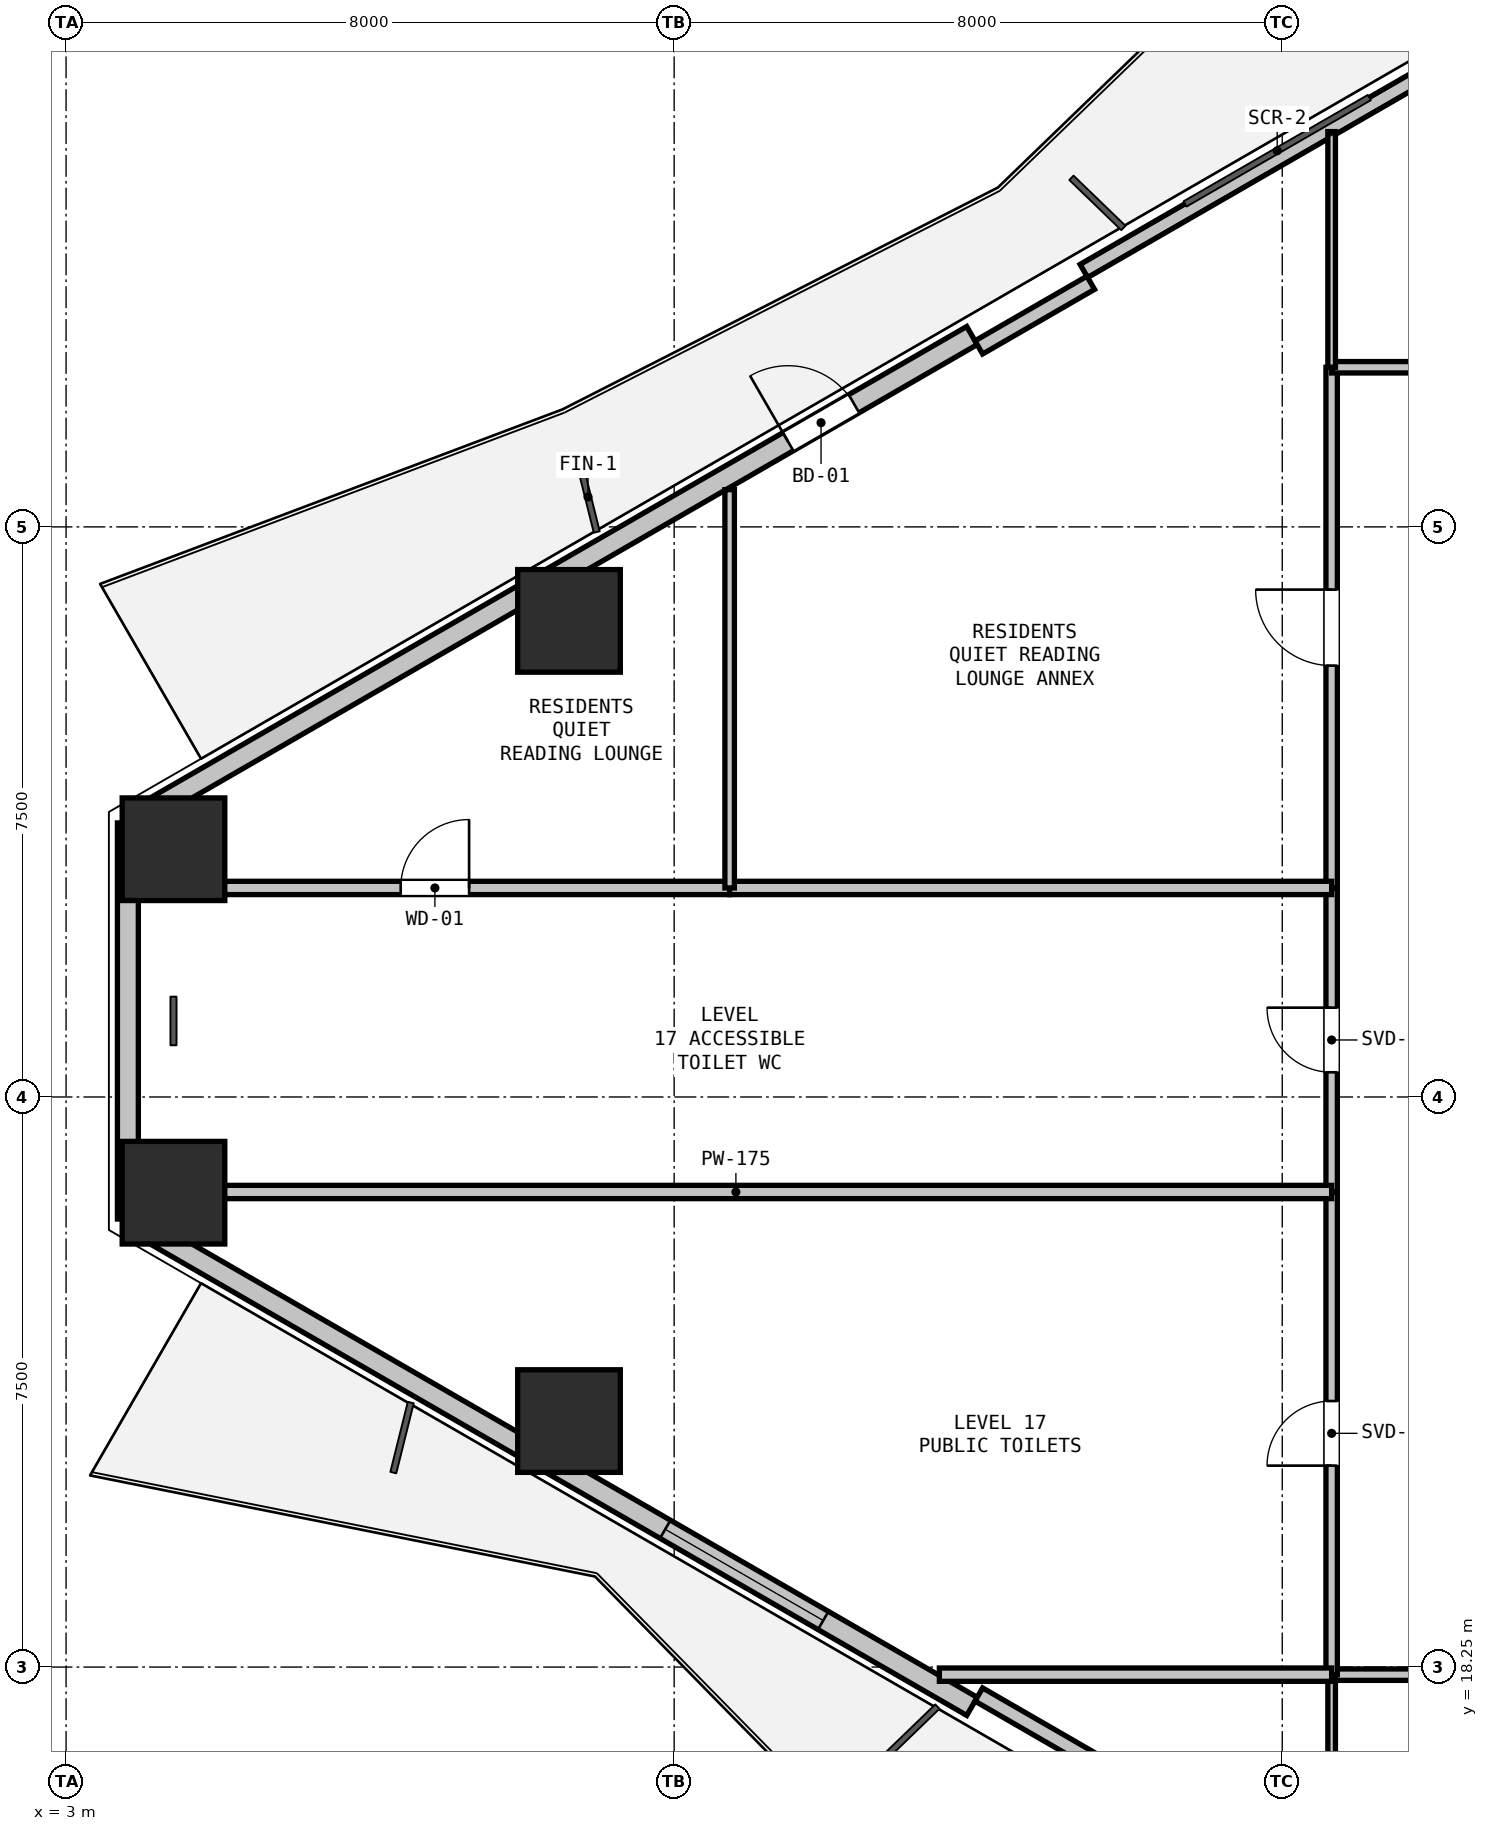
"""IFC4 building model, lengths in metres.
Left out: names, types, materials, properties, quantities, classifications, styles, units other than length and angle.
Written with IfcOpenShell. Run it as: python <this file> out.ifc"""

import sys

from ifc_helpers import new_model, si_unit, direction, frame, frame_2d, origin, origin_2d, place, context, subcontext, project, spatial, rectangle, hollow_rectangle, extrude, element, fill, save


model = new_model("IFC4")
c1 = context("Model", 3, precision=1e-05, world=origin(), true_north=direction((0.0, 1.0)))
c2 = subcontext(c1, "Body", "Model", "MODEL_VIEW")
j1 = project(units=[si_unit("LENGTHUNIT", "METRE"), si_unit("PLANEANGLEUNIT", "RADIAN")], contexts=[c1])
p1 = place(None, origin())
s1 = spatial("IfcSite", under=j1, at=p1, CompositionType="ELEMENT")
p2 = place(p1, origin())
s2 = spatial("IfcBuilding", under=s1, at=p2, CompositionType="ELEMENT")
p3 = place(p2, frame((0.0, 0.0, 62.1)))
s3 = spatial("IfcBuildingStorey", under=s2, at=p3, CompositionType="ELEMENT", Elevation=62.1)
p4 = place(p3, frame((4.413, 29.009, 0.0), z_axis=(0.0, 0.0, 1.0), x_axis=(1.0, 0.0, 0.0)))
e1 = element("IfcColumn", 1, at=p4, inside=s3, PredefinedType="COLUMN", context=c2, shape_type="SweptSolid", body=[
    extrude(hollow_rectangle(XDim=1.35, YDim=1.35, WallThickness=0.036, at=origin_2d()), origin(), (0.0, 0.0, 1.0), 2.88),
])
for number, where, z_axis, x_axis in (
    (2, (9.617, 32.014, 0.0), (0.0, 0.0, 1.0), (1.0, 0.0, 0.0)),
    (3, (9.617, 21.486, 0.0), (0.0, 0.0, 1.0), (1.0, 0.0, 0.0)),
):
    element("IfcColumn", number, at=place(p3, frame(where, z_axis=z_axis, x_axis=x_axis)), inside=s3, PredefinedType="COLUMN", context=c2, shape_type="SweptSolid", body=[
        extrude(hollow_rectangle(XDim=1.35, YDim=1.35, WallThickness=0.036, at=origin_2d()), origin(), (0.0, 0.0, 1.0), 3.13),
    ])
p5 = place(p3, frame((4.413, 24.491, 0.0), z_axis=(0.0, 0.0, 1.0), x_axis=(1.0, 0.0, 0.0)))
e4 = element("IfcColumn", 4, at=p5, inside=s3, PredefinedType="COLUMN", context=c2, shape_type="SweptSolid", body=[
    extrude(hollow_rectangle(XDim=1.35, YDim=1.35, WallThickness=0.036, at=origin_2d()), origin(), (0.0, 0.0, 1.0), 2.88),
])
p6 = place(p3, frame((3.813, 24.144, 0.0), z_axis=(0.0, 0.0, 1.0), x_axis=(0.0, 1.0, 0.0)))
e5 = element("IfcWall", 5, at=p6, inside=s3, PredefinedType="SOLIDWALL", context=c2, shape_type="SweptSolid", body=[
    extrude(rectangle(XDim=5.211, YDim=0.275, at=frame_2d((2.606, 0.0))), origin(), (0.0, 0.0, 1.0), 4.1),
])
p7 = place(p3, frame((3.943, 29.431, 0.0), z_axis=(0.0, 0.0, 1.0), x_axis=(0.866027105532, 0.499997052475, 0.0)))
e6 = element("IfcWall", 6, at=p7, inside=s3, PredefinedType="SOLIDWALL", context=c2, shape_type="SweptSolid", body=[
    extrude(rectangle(XDim=12.673, YDim=0.275, at=frame_2d((6.336, 0.0))), origin(), (0.0, 0.0, 1.0), 2.865),
])
p8 = place(p7, frame((9.88, 0.0, 0.0)))
e7 = element("IfcOpeningElement", 7, at=p8, cuts=e6, PredefinedType="OPENING", context=c2, shape_type="SweptSolid", body=[
    extrude(rectangle(XDim=1.0, YDim=2.1, at=frame_2d((0.5, 1.05))), frame((0.0, 0.147, 0.0), z_axis=(0.0, -1.0, 0.0), x_axis=(1.0, 0.0, 0.0)), (0.0, 0.0, 1.0), 0.295),
])
p9 = place(p3, frame((16.39, 36.617, 0.0), z_axis=(0.0, 0.0, 1.0), x_axis=(0.866027351828, 0.499996625875, 0.0)))
e8 = element("IfcWall", 8, at=p9, inside=s3, PredefinedType="PARAPET", context=c2, shape_type="SweptSolid", body=[
    extrude(rectangle(XDim=11.973, YDim=0.2, at=frame_2d((5.987, 0.0))), origin(), (0.0, 0.0, 1.0), 0.2),
])
p10 = place(p3, frame((15.008, 35.611, 0.0), z_axis=(0.0, 0.0, 1.0), x_axis=(0.86605165483, 0.499954529098, 0.0)))
e9 = element("IfcWall", 9, at=p10, inside=s3, PredefinedType="PARAPET", context=c2, shape_type="SweptSolid", body=[
    extrude(rectangle(XDim=1.7, YDim=0.2, at=frame_2d((0.85, 0.0))), origin(), (0.0, 0.0, 1.0), 4.1),
])
p11 = place(p3, frame((14.918, 17.733, 0.0), z_axis=(0.0, 0.0, 1.0), x_axis=(-0.866027105532, 0.499997052475, 0.0)))
e10 = element("IfcWall", 10, at=p11, inside=s3, PredefinedType="SOLIDWALL", context=c2, shape_type="SweptSolid", body=[
    extrude(rectangle(XDim=12.673, YDim=0.275, at=frame_2d((6.336, 0.0))), origin(), (0.0, 0.0, 1.0), 2.865),
])
p12 = place(p11, frame((2.26, 0.0, 0.9)))
e11 = element("IfcOpeningElement", 11, at=p12, cuts=e10, PredefinedType="OPENING", context=c2, shape_type="SweptSolid", body=[
    extrude(rectangle(XDim=2.4, YDim=1.89, at=frame_2d((1.2, 0.945))), frame((0.0, 0.147, 0.0), z_axis=(0.0, -1.0, 0.0), x_axis=(1.0, 0.0, 0.0)), (0.0, 0.0, 1.0), 0.295),
])
p13 = place(p3, frame((16.48, 17.039, 0.0), z_axis=(0.0, 0.0, 1.0), x_axis=(-0.86605165483, 0.499954529098, 0.0)))
e12 = element("IfcWall", 12, at=p13, inside=s3, PredefinedType="PARAPET", context=c2, shape_type="SweptSolid", body=[
    extrude(rectangle(XDim=1.7, YDim=0.2, at=frame_2d((0.85, 0.0))), origin(), (0.0, 0.0, 1.0), 4.1),
])
p14 = place(p3, frame((26.5, 18.15, 0.0), z_axis=(0.0, 0.0, 1.0), x_axis=(-1.0, 0.0, 0.0)))
e13 = element("IfcWall", 13, at=p14, inside=s3, PredefinedType="PARTITIONING", context=c2, shape_type="SweptSolid", body=[
    extrude(rectangle(XDim=6.85, YDim=0.15, at=frame_2d((3.425, 0.0))), origin(), (0.0, 0.0, 1.0), 4.48),
])
p15 = place(p14, frame((2.925, 0.0, 0.0)))
e14 = element("IfcOpeningElement", 14, at=p15, cuts=e13, PredefinedType="OPENING", context=c2, shape_type="SweptSolid", body=[
    extrude(rectangle(XDim=1.0, YDim=2.15, at=frame_2d((0.5, 1.075))), frame((0.0, 0.085, 0.0), z_axis=(0.0, -1.0, 0.0), x_axis=(1.0, 0.0, 0.0)), (0.0, 0.0, 1.0), 0.17),
])
p16 = place(p3, frame((19.65, 18.15, 0.0), z_axis=(0.0, 0.0, 1.0), x_axis=(0.0, 1.0, 0.0)))
e15 = element("IfcWall", 15, at=p16, inside=s3, PredefinedType="PARTITIONING", context=c2, shape_type="SweptSolid", body=[
    extrude(rectangle(XDim=6.35, YDim=0.15, at=frame_2d((3.175, 0.0))), origin(), (0.0, 0.0, 1.0), 2.865),
])
p17 = place(p16, frame((2.75, 0.0, 0.0)))
e16 = element("IfcOpeningElement", 16, at=p17, cuts=e15, PredefinedType="OPENING", context=c2, shape_type="SweptSolid", body=[
    extrude(rectangle(XDim=0.85, YDim=2.1, at=frame_2d((0.425, 1.05))), frame((0.0, 0.085, 0.0), z_axis=(0.0, -1.0, 0.0), x_axis=(1.0, 0.0, 0.0)), (0.0, 0.0, 1.0), 0.17),
])
p18 = place(p3, frame((19.65, 24.5, 0.0), z_axis=(0.0, 0.0, 1.0), x_axis=(0.0, 1.0, 0.0)))
e17 = element("IfcWall", 17, at=p18, inside=s3, PredefinedType="PARTITIONING", context=c2, shape_type="SweptSolid", body=[
    extrude(rectangle(XDim=4.0, YDim=0.15, at=frame_2d((2.0, 0.0))), origin(), (0.0, 0.0, 1.0), 2.865),
])
p19 = place(p18, frame((1.575, 0.0, 0.0)))
e18 = element("IfcOpeningElement", 18, at=p19, cuts=e17, PredefinedType="OPENING", context=c2, shape_type="SweptSolid", body=[
    extrude(rectangle(XDim=0.85, YDim=2.1, at=frame_2d((0.425, 1.05))), frame((0.0, 0.085, 0.0), z_axis=(0.0, -1.0, 0.0), x_axis=(1.0, 0.0, 0.0)), (0.0, 0.0, 1.0), 0.17),
])
p20 = place(p3, frame((19.65, 28.5, 0.0), z_axis=(0.0, 0.0, 1.0), x_axis=(0.0, 1.0, 0.0)))
e19 = element("IfcWall", 19, at=p20, inside=s3, PredefinedType="PARTITIONING", context=c2, shape_type="SweptSolid", body=[
    extrude(rectangle(XDim=6.85, YDim=0.15, at=frame_2d((3.425, 0.0))), origin(), (0.0, 0.0, 1.0), 4.48),
])
p21 = place(p20, frame((2.925, 0.0, 0.0)))
e20 = element("IfcOpeningElement", 20, at=p21, cuts=e19, PredefinedType="OPENING", context=c2, shape_type="SweptSolid", body=[
    extrude(rectangle(XDim=1.0, YDim=2.15, at=frame_2d((0.5, 1.075))), frame((0.0, 0.085, 0.0), z_axis=(0.0, -1.0, 0.0), x_axis=(1.0, 0.0, 0.0)), (0.0, 0.0, 1.0), 0.17),
])
p22 = place(p3, frame((19.65, 35.35, 0.0), z_axis=(0.0, 0.0, 1.0), x_axis=(1.0, 0.0, 0.0)))
e21 = element("IfcWall", 21, at=p22, inside=s3, PredefinedType="PARTITIONING", context=c2, shape_type="SweptSolid", body=[
    extrude(rectangle(XDim=10.85, YDim=0.15, at=frame_2d((5.425, 0.0))), origin(), (0.0, 0.0, 1.0), 4.48),
])
p23 = place(p22, frame((4.525, 0.0, 0.0)))
e22 = element("IfcOpeningElement", 22, at=p23, cuts=e21, PredefinedType="OPENING", context=c2, shape_type="SweptSolid", body=[
    extrude(rectangle(XDim=1.8, YDim=2.2, at=frame_2d((0.9, 1.1))), frame((0.0, 0.085, 0.0), z_axis=(0.0, -1.0, 0.0), x_axis=(1.0, 0.0, 0.0)), (0.0, 0.0, 1.0), 0.17),
])
p24 = place(p3, frame((19.65, 15.049, 0.0), z_axis=(0.0, 0.0, 1.0), x_axis=(0.0, 1.0, 0.0)))
e23 = element("IfcWall", 23, at=p24, inside=s3, PredefinedType="PARTITIONING", context=c2, shape_type="SweptSolid", body=[
    extrude(rectangle(XDim=3.101, YDim=0.1, at=frame_2d((1.55, 0.0))), origin(), (0.0, 0.0, 1.0), 2.365),
])
p25 = place(p3, frame((3.975, 24.5, 0.0), z_axis=(0.0, 0.0, 1.0), x_axis=(1.0, 0.0, 0.0)))
e24 = element("IfcWall", 24, at=p25, inside=s3, PredefinedType="PLUMBINGWALL", context=c2, shape_type="SweptSolid", body=[
    extrude(rectangle(XDim=15.675, YDim=0.175, at=frame_2d((7.838, 0.0))), origin(), (0.0, 0.0, 1.0), 2.865),
])
p26 = place(p3, frame((19.65, 18.15, 0.0), z_axis=(0.0, 0.0, 1.0), x_axis=(-1.0, 0.0, 0.0)))
e25 = element("IfcWall", 25, at=p26, inside=s3, PredefinedType="PLUMBINGWALL", context=c2, shape_type="SweptSolid", body=[
    extrude(rectangle(XDim=5.161, YDim=0.175, at=frame_2d((2.58, 0.0))), origin(), (0.0, 0.0, 1.0), 2.365),
])
p27 = place(p3, frame((3.943, 24.069, 0.0), z_axis=(0.0, 0.0, 1.0), x_axis=(-0.866131372301, 0.499816412211, 0.0)))
e26 = element("IfcWall", 26, at=p27, inside=s3, PredefinedType="PLUMBINGWALL", context=c2, shape_type="SweptSolid", body=[
    extrude(rectangle(XDim=0.15, YDim=0.175, at=frame_2d((0.075, 0.0))), origin(), (0.0, 0.0, 1.0), 4.48),
])
p28 = place(p3, frame((3.975, 28.5, 0.0), z_axis=(0.0, 0.0, 1.0), x_axis=(1.0, 0.0, 0.0)))
e27 = element("IfcWall", 27, at=p28, inside=s3, PredefinedType="PLUMBINGWALL", context=c2, shape_type="SweptSolid", body=[
    extrude(rectangle(XDim=7.755, YDim=0.175, at=frame_2d((3.878, 0.0))), origin(), (0.0, 0.0, 1.0), 2.865),
])
p29 = place(p28, frame((3.428, 0.0, 0.0)))
e28 = element("IfcOpeningElement", 28, at=p29, cuts=e27, PredefinedType="OPENING", context=c2, shape_type="SweptSolid", body=[
    extrude(rectangle(XDim=0.9, YDim=2.1, at=frame_2d((0.45, 1.05))), frame((0.0, 0.097, 0.0), z_axis=(0.0, -1.0, 0.0), x_axis=(1.0, 0.0, 0.0)), (0.0, 0.0, 1.0), 0.195),
])
p30 = place(p3, frame((11.73, 28.5, 0.0), z_axis=(0.0, 0.0, 1.0), x_axis=(1.0, 0.0, 0.0)))
e29 = element("IfcWall", 29, at=p30, inside=s3, PredefinedType="PLUMBINGWALL", context=c2, shape_type="SweptSolid", body=[
    extrude(rectangle(XDim=7.92, YDim=0.175, at=frame_2d((3.96, 0.0))), origin(), (0.0, 0.0, 1.0), 3.115),
])
p31 = place(p3, frame((19.65, 35.35, 0.0), z_axis=(0.0, 0.0, 1.0), x_axis=(0.0, 1.0, 0.0)))
e30 = element("IfcWall", 30, at=p31, inside=s3, PredefinedType="PARTITIONING", context=c2, shape_type="SweptSolid", body=[
    extrude(rectangle(XDim=3.101, YDim=0.1, at=frame_2d((1.55, 0.0))), origin(), (0.0, 0.0, 1.0), 2.365),
])
p32 = place(p3, frame((3.813, 29.356, 0.0), z_axis=(0.0, 0.0, 1.0), x_axis=(0.866131372301, 0.499816412211, 0.0)))
e31 = element("IfcWall", 31, at=p32, inside=s3, PredefinedType="PARTITIONING", context=c2, shape_type="SweptSolid", body=[
    extrude(rectangle(XDim=0.15, YDim=0.1, at=frame_2d((0.075, 0.0))), origin(), (0.0, 0.0, 1.0), 4.48),
])
p33 = place(p3, frame((11.73, 33.74, 0.0), z_axis=(0.0, 0.0, 1.0), x_axis=(0.0, -1.0, 0.0)))
e32 = element("IfcWall", 32, at=p33, inside=s3, PredefinedType="PARTITIONING", context=c2, shape_type="SweptSolid", body=[
    extrude(rectangle(XDim=5.24, YDim=0.125, at=frame_2d((2.62, 0.0))), origin(), (0.0, 0.0, 1.0), 2.365),
])
p34 = place(p8, origin())
e33 = element("IfcDoor", 33, at=p34, inside=s3, OperationType="SINGLE_SWING_LEFT", PredefinedType="DOOR", context=c2, shape_type="SweptSolid", body=[
    extrude(rectangle(XDim=1.0, YDim=2.1, at=frame_2d((0.5, 1.05))), frame((0.0, 0.025, 0.0), z_axis=(0.0, -1.0, 0.0), x_axis=(1.0, 0.0, 0.0)), (0.0, 0.0, 1.0), 0.05),
])
fill(e7, e33)
p35 = place(p12, origin())
e34 = element("IfcWindow", 34, at=p35, inside=s3, PartitioningType="SINGLE_PANEL", PredefinedType="WINDOW", context=c2, shape_type="SweptSolid", body=[
    extrude(rectangle(XDim=2.4, YDim=1.89, at=frame_2d((1.2, 0.945))), frame((0.0, 0.03, 0.0), z_axis=(0.0, -1.0, 0.0), x_axis=(1.0, 0.0, 0.0)), (0.0, 0.0, 1.0), 0.06),
])
fill(e11, e34)
p36 = place(p17, origin())
e35 = element("IfcDoor", 35, at=p36, inside=s3, OperationType="SINGLE_SWING_LEFT", PredefinedType="DOOR", context=c2, shape_type="SweptSolid", body=[
    extrude(rectangle(XDim=0.85, YDim=2.1, at=frame_2d((0.425, 1.05))), frame((0.0, 0.025, 0.0), z_axis=(0.0, -1.0, 0.0), x_axis=(1.0, 0.0, 0.0)), (0.0, 0.0, 1.0), 0.05),
])
fill(e16, e35)
p37 = place(p19, origin())
e36 = element("IfcDoor", 36, at=p37, inside=s3, OperationType="SINGLE_SWING_RIGHT", PredefinedType="DOOR", context=c2, shape_type="SweptSolid", body=[
    extrude(rectangle(XDim=0.85, YDim=2.1, at=frame_2d((0.425, 1.05))), frame((0.0, 0.025, 0.0), z_axis=(0.0, -1.0, 0.0), x_axis=(1.0, 0.0, 0.0)), (0.0, 0.0, 1.0), 0.05),
])
fill(e18, e36)
p38 = place(p21, origin())
e37 = element("IfcDoor", 37, at=p38, inside=s3, OperationType="SINGLE_SWING_RIGHT", PredefinedType="DOOR", context=c2, shape_type="SweptSolid", body=[
    extrude(rectangle(XDim=1.0, YDim=2.15, at=frame_2d((0.5, 1.075))), frame((0.0, 0.025, 0.0), z_axis=(0.0, -1.0, 0.0), x_axis=(1.0, 0.0, 0.0)), (0.0, 0.0, 1.0), 0.05),
])
fill(e20, e37)
p39 = place(p29, origin())
e38 = element("IfcDoor", 38, at=p39, inside=s3, OperationType="SINGLE_SWING_RIGHT", PredefinedType="DOOR", context=c2, shape_type="SweptSolid", body=[
    extrude(rectangle(XDim=0.9, YDim=2.1, at=frame_2d((0.45, 1.05))), frame((0.0, 0.025, 0.0), z_axis=(0.0, -1.0, 0.0), x_axis=(1.0, 0.0, 0.0)), (0.0, 0.0, 1.0), 0.05),
])
fill(e28, e38)
save(model, sys.argv[1])
